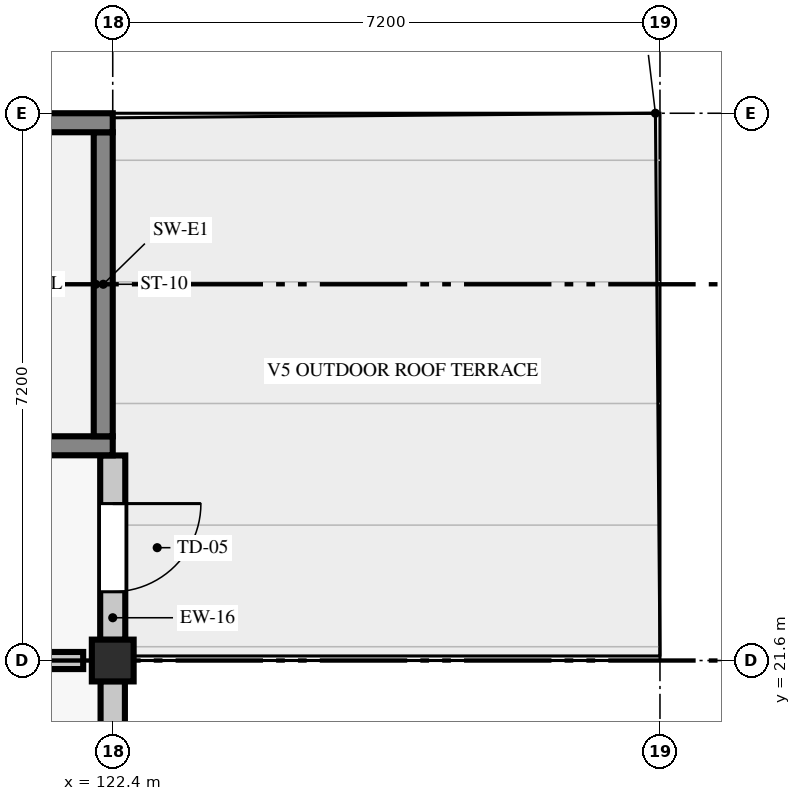
"""IFC4 building model, lengths in metres.
Left out: names, types, materials, properties, quantities, classifications, styles, units other than length and angle.
Written with IfcOpenShell. Run it as: python <this file> out.ifc"""

import sys

from ifc_helpers import new_model, si_unit, direction, frame, frame_2d, origin, origin_2d, place, context, subcontext, project, spatial, rectangle, extrude, element, fill, save


model = new_model("IFC4")
c1 = context("Model", 3, precision=1e-05, world=origin(), true_north=direction((0.0, 1.0)))
c2 = subcontext(c1, "Body", "Model", "MODEL_VIEW")
j1 = project(units=[si_unit("LENGTHUNIT", "METRE"), si_unit("PLANEANGLEUNIT", "RADIAN")], contexts=[c1])
p1 = place(None, origin())
s1 = spatial("IfcSite", under=j1, at=p1, CompositionType="ELEMENT")
p2 = place(p1, origin())
s2 = spatial("IfcBuilding", under=s1, at=p2, CompositionType="ELEMENT")
p3 = place(p2, frame((0.0, 0.0, 13.8)))
s3 = spatial("IfcBuildingStorey", under=s2, at=p3, CompositionType="ELEMENT", Elevation=13.8)
p4 = place(p3, frame((122.4, 21.6, 0.0), z_axis=(0.0, 0.0, 1.0), x_axis=(1.0, 0.0, 0.0)))
e1 = element("IfcColumn", 1, at=p4, inside=s3, PredefinedType="COLUMN", context=c2, shape_type="SweptSolid", body=[
    extrude(rectangle(XDim=0.55, YDim=0.55, at=origin_2d()), origin(), (0.0, 0.0, 1.0), 3.88),
])
p5 = place(p3, frame((122.4, 14.671, 0.0), z_axis=(0.0, 0.0, 1.0), x_axis=(0.0, 1.0, 0.0)))
e2 = element("IfcWall", 2, at=p5, inside=s3, PredefinedType="STANDARD", context=c2, shape_type="SweptSolid", body=[
    extrude(rectangle(XDim=6.658, YDim=0.32, at=frame_2d((3.329, 0.0))), origin(), (0.0, 0.0, 1.0), 3.278),
])
p6 = place(p5, frame((2.629, 0.0, 0.9)))
e3 = element("IfcOpeningElement", 3, at=p6, cuts=e2, PredefinedType="OPENING", context=c2, shape_type="SweptSolid", body=[
    extrude(rectangle(XDim=1.4, YDim=1.42, at=frame_2d((0.7, 0.71))), frame((0.0, 0.17, 0.0), z_axis=(0.0, -1.0, 0.0), x_axis=(1.0, 0.0, 0.0)), (0.0, 0.0, 1.0), 0.34),
])
p7 = place(p3, frame((122.4, 21.871, 0.0), z_axis=(0.0, 0.0, 1.0), x_axis=(0.0, 1.0, 0.0)))
e4 = element("IfcWall", 4, at=p7, inside=s3, PredefinedType="STANDARD", context=c2, shape_type="SweptSolid", body=[
    extrude(rectangle(XDim=2.427, YDim=0.33, at=frame_2d((1.213, 0.0))), origin(), (0.0, 0.0, 1.0), 3.88),
])
p8 = place(p7, frame((0.634, 0.0, 0.0)))
e5 = element("IfcOpeningElement", 5, at=p8, cuts=e4, PredefinedType="OPENING", context=c2, shape_type="SweptSolid", body=[
    extrude(rectangle(XDim=1.16, YDim=2.14, at=frame_2d((0.58, 1.07))), frame((0.0, 0.175, 0.0), z_axis=(0.0, -1.0, 0.0), x_axis=(1.0, 0.0, 0.0)), (0.0, 0.0, 1.0), 0.35),
])
p9 = place(p3, frame((113.6, 24.425, 0.0), z_axis=(0.0, 0.0, 1.0), x_axis=(1.0, 0.0, 0.0)))
e6 = element("IfcWall", 6, at=p9, inside=s3, PredefinedType="SHEAR", context=c2, shape_type="SweptSolid", body=[
    extrude(rectangle(XDim=8.8, YDim=0.25, at=frame_2d((4.4, 0.0))), origin(), (0.0, 0.0, 1.0), 3.88),
])
p10 = place(p9, frame((0.3, 0.0, 0.0)))
e7 = element("IfcOpeningElement", 7, at=p10, cuts=e6, PredefinedType="OPENING", context=c2, shape_type="SweptSolid", body=[
    extrude(rectangle(XDim=1.5, YDim=2.15, at=frame_2d((0.75, 1.075))), frame((0.0, 0.135, 0.0), z_axis=(0.0, -1.0, 0.0), x_axis=(1.0, 0.0, 0.0)), (0.0, 0.0, 1.0), 0.27),
])
p11 = place(p3, frame((122.275, 24.55, 0.0), z_axis=(0.0, 0.0, 1.0), x_axis=(0.0, 1.0, 0.0)))
e8 = element("IfcWall", 8, at=p11, inside=s3, PredefinedType="SHEAR", context=c2, shape_type="SweptSolid", body=[
    extrude(rectangle(XDim=4.0, YDim=0.25, at=frame_2d((2.0, 0.0))), origin(), (0.0, 0.0, 1.0), 3.88),
])
p12 = place(p3, frame((122.4, 28.675, 0.0), z_axis=(0.0, 0.0, 1.0), x_axis=(-1.0, 0.0, 0.0)))
e9 = element("IfcWall", 9, at=p12, inside=s3, PredefinedType="SHEAR", context=c2, shape_type="SweptSolid", body=[
    extrude(rectangle(XDim=8.8, YDim=0.25, at=frame_2d((4.4, 0.0))), origin(), (0.0, 0.0, 1.0), 3.88),
])
p13 = place(p12, frame((7.27, 0.0, 0.92)))
e10 = element("IfcOpeningElement", 10, at=p13, cuts=e9, PredefinedType="OPENING", context=c2, shape_type="SweptSolid", body=[
    extrude(rectangle(XDim=1.18, YDim=1.48, at=frame_2d((0.59, 0.74))), frame((0.0, 0.135, 0.0), z_axis=(0.0, -1.0, 0.0), x_axis=(1.0, 0.0, 0.0)), (0.0, 0.0, 1.0), 0.27),
])
p14 = place(p3, frame((93.989, 21.6, 0.0), z_axis=(0.0, 0.0, 1.0), x_axis=(1.0, 0.0, 0.0)))
e11 = element("IfcWall", 11, at=p14, inside=s3, PredefinedType="PARTITIONING", context=c2, shape_type="SweptSolid", body=[
    extrude(rectangle(XDim=28.022, YDim=0.225, at=frame_2d((14.011, 0.0))), origin(), (0.0, 0.0, 1.0), 3.18),
])
p15 = place(p14, frame((2.729, 0.0, 0.0)))
e12 = element("IfcOpeningElement", 12, at=p15, cuts=e11, PredefinedType="OPENING", context=c2, shape_type="SweptSolid", body=[
    extrude(rectangle(XDim=1.05, YDim=2.13, at=frame_2d((0.525, 1.065))), frame((0.0, 0.123, 0.0), z_axis=(0.0, -1.0, 0.0), x_axis=(1.0, 0.0, 0.0)), (0.0, 0.0, 1.0), 0.245),
])
p16 = place(p14, frame((7.791, 0.0, 0.0)))
e13 = element("IfcOpeningElement", 13, at=p16, cuts=e11, PredefinedType="OPENING", context=c2, shape_type="SweptSolid", body=[
    extrude(rectangle(XDim=0.92, YDim=2.18, at=frame_2d((0.46, 1.09))), frame((0.0, 0.123, 0.0), z_axis=(0.0, -1.0, 0.0), x_axis=(1.0, 0.0, 0.0)), (0.0, 0.0, 1.0), 0.245),
])
p17 = place(p14, frame((9.991, 0.0, 0.0)))
e14 = element("IfcOpeningElement", 14, at=p17, cuts=e11, PredefinedType="OPENING", context=c2, shape_type="SweptSolid", body=[
    extrude(rectangle(XDim=0.94, YDim=2.08, at=frame_2d((0.47, 1.04))), frame((0.0, 0.123, 0.0), z_axis=(0.0, -1.0, 0.0), x_axis=(1.0, 0.0, 0.0)), (0.0, 0.0, 1.0), 0.245),
])
p18 = place(p14, frame((12.281, 0.0, 0.0)))
e15 = element("IfcOpeningElement", 15, at=p18, cuts=e11, PredefinedType="OPENING", context=c2, shape_type="SweptSolid", body=[
    extrude(rectangle(XDim=0.9, YDim=2.08, at=frame_2d((0.45, 1.04))), frame((0.0, 0.123, 0.0), z_axis=(0.0, -1.0, 0.0), x_axis=(1.0, 0.0, 0.0)), (0.0, 0.0, 1.0), 0.245),
])
p19 = place(p14, frame((16.756, 0.0, 0.0)))
e16 = element("IfcOpeningElement", 16, at=p19, cuts=e11, PredefinedType="OPENING", context=c2, shape_type="SweptSolid", body=[
    extrude(rectangle(XDim=0.97, YDim=2.18, at=frame_2d((0.485, 1.09))), frame((0.0, 0.123, 0.0), z_axis=(0.0, -1.0, 0.0), x_axis=(1.0, 0.0, 0.0)), (0.0, 0.0, 1.0), 0.245),
])
p20 = place(p14, frame((24.114, 0.0, 0.0)))
e17 = element("IfcOpeningElement", 17, at=p20, cuts=e11, PredefinedType="OPENING", context=c2, shape_type="SweptSolid", body=[
    extrude(rectangle(XDim=1.03, YDim=2.18, at=frame_2d((0.515, 1.09))), frame((0.0, 0.123, 0.0), z_axis=(0.0, -1.0, 0.0), x_axis=(1.0, 0.0, 0.0)), (0.0, 0.0, 1.0), 0.245),
])
p21 = place(p8, frame((1.16, 0.0, 0.0), z_axis=(0.0, 0.0, 1.0), x_axis=(-1.0, 0.0, 0.0)))
e18 = element("IfcDoor", 18, at=p21, inside=s3, OperationType="SINGLE_SWING_LEFT", PredefinedType="DOOR", context=c2, shape_type="SweptSolid", body=[
    extrude(rectangle(XDim=1.16, YDim=2.14, at=frame_2d((0.58, 1.07))), frame((0.0, 0.025, 0.0), z_axis=(0.0, -1.0, 0.0), x_axis=(1.0, 0.0, 0.0)), (0.0, 0.0, 1.0), 0.05),
])
fill(e5, e18)
save(model, sys.argv[1])
